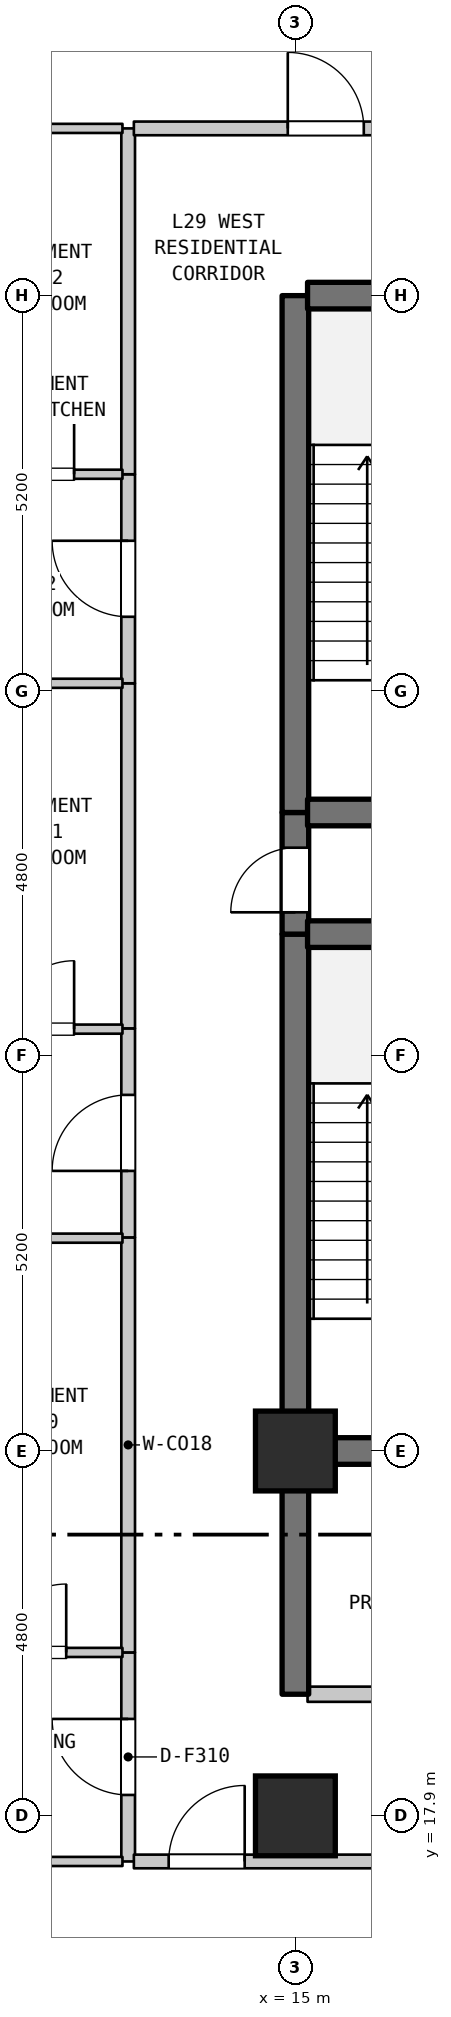
"""IFC4 building model, lengths in metres.
Left out: names, types, materials, properties, quantities, classifications, styles, units other than length and angle.
Written with IfcOpenShell. Run it as: python <this file> out.ifc"""

import sys

from ifc_helpers import new_model, si_unit, direction, frame, frame_2d, origin, origin_2d, place, context, subcontext, project, spatial, rectangle, extrude, element, fill, save


model = new_model("IFC4")
c1 = context("Model", 3, precision=1e-05, world=origin(), true_north=direction((0.0, 1.0)))
c2 = subcontext(c1, "Body", "Model", "MODEL_VIEW")
j1 = project(units=[si_unit("LENGTHUNIT", "METRE"), si_unit("PLANEANGLEUNIT", "RADIAN")], contexts=[c1])
p1 = place(None, origin())
s1 = spatial("IfcSite", under=j1, at=p1, CompositionType="ELEMENT")
p2 = place(p1, origin())
s2 = spatial("IfcBuilding", under=s1, at=p2, CompositionType="ELEMENT")
p3 = place(p2, frame((0.0, 0.0, 120.5)))
s3 = spatial("IfcBuildingStorey", under=s2, at=p3, CompositionType="ELEMENT", Elevation=120.5)
for number, where, z_axis, x_axis in (
    (1, (15.0, 17.9, 0.0), (0.0, 0.0, 1.0), (1.0, 0.0, 0.0)),
    (2, (15.0, 22.7, 0.0), (0.0, 0.0, 1.0), (1.0, 0.0, 0.0)),
):
    element("IfcColumn", number, at=place(p3, frame(where, z_axis=z_axis, x_axis=x_axis)), inside=s3, PredefinedType="COLUMN", context=c2, shape_type="SweptSolid", body=[
        extrude(rectangle(XDim=1.05, YDim=1.05, at=origin_2d()), origin(), (0.0, 0.0, 1.0), 4.8),
    ])
p4 = place(p3, frame((12.8, 17.3, 0.0), z_axis=(0.0, 0.0, 1.0), x_axis=(0.0, 1.0, 0.0)))
e3 = element("IfcWall", 3, at=p4, inside=s3, PredefinedType="STANDARD", context=c2, shape_type="SweptSolid", body=[
    extrude(rectangle(XDim=2.75, YDim=0.18, at=frame_2d((1.375, 0.0))), origin(), (0.0, 0.0, 1.0), 4.48),
])
p5 = place(p4, frame((0.875, 0.0, 0.0)))
e4 = element("IfcOpeningElement", 4, at=p5, cuts=e3, PredefinedType="OPENING", context=c2, shape_type="SweptSolid", body=[
    extrude(rectangle(XDim=1.0, YDim=2.15, at=frame_2d((0.5, 1.075))), frame((0.0, 0.1, 0.0), z_axis=(0.0, -1.0, 0.0), x_axis=(1.0, 0.0, 0.0)), (0.0, 0.0, 1.0), 0.2),
])
p6 = place(p3, frame((12.8, 20.05, 0.0), z_axis=(0.0, 0.0, 1.0), x_axis=(0.0, 1.0, 0.0)))
e5 = element("IfcWall", 5, at=p6, inside=s3, PredefinedType="STANDARD", context=c2, shape_type="SweptSolid", body=[
    extrude(rectangle(XDim=5.46, YDim=0.18, at=frame_2d((2.73, 0.0))), origin(), (0.0, 0.0, 1.0), 4.48),
])
p7 = place(p3, frame((12.8, 25.51, 0.0), z_axis=(0.0, 0.0, 1.0), x_axis=(0.0, 1.0, 0.0)))
e6 = element("IfcWall", 6, at=p7, inside=s3, PredefinedType="STANDARD", context=c2, shape_type="SweptSolid", body=[
    extrude(rectangle(XDim=2.75, YDim=0.18, at=frame_2d((1.375, 0.0))), origin(), (0.0, 0.0, 1.0), 4.48),
])
p8 = place(p7, frame((0.875, 0.0, 0.0)))
e7 = element("IfcOpeningElement", 7, at=p8, cuts=e6, PredefinedType="OPENING", context=c2, shape_type="SweptSolid", body=[
    extrude(rectangle(XDim=1.0, YDim=2.15, at=frame_2d((0.5, 1.075))), frame((0.0, 0.1, 0.0), z_axis=(0.0, -1.0, 0.0), x_axis=(1.0, 0.0, 0.0)), (0.0, 0.0, 1.0), 0.2),
])
p9 = place(p3, frame((12.8, 28.26, 0.0), z_axis=(0.0, 0.0, 1.0), x_axis=(0.0, 1.0, 0.0)))
e8 = element("IfcWall", 8, at=p9, inside=s3, PredefinedType="STANDARD", context=c2, shape_type="SweptSolid", body=[
    extrude(rectangle(XDim=4.54, YDim=0.18, at=frame_2d((2.27, 0.0))), origin(), (0.0, 0.0, 1.0), 4.48),
])
p10 = place(p3, frame((12.8, 32.8, 0.0), z_axis=(0.0, 0.0, 1.0), x_axis=(0.0, 1.0, 0.0)))
e9 = element("IfcWall", 9, at=p10, inside=s3, PredefinedType="STANDARD", context=c2, shape_type="SweptSolid", body=[
    extrude(rectangle(XDim=2.75, YDim=0.18, at=frame_2d((1.375, 0.0))), origin(), (0.0, 0.0, 1.0), 4.48),
])
p11 = place(p10, frame((0.875, 0.0, 0.0)))
e10 = element("IfcOpeningElement", 10, at=p11, cuts=e9, PredefinedType="OPENING", context=c2, shape_type="SweptSolid", body=[
    extrude(rectangle(XDim=1.0, YDim=2.15, at=frame_2d((0.5, 1.075))), frame((0.0, 0.1, 0.0), z_axis=(0.0, -1.0, 0.0), x_axis=(1.0, 0.0, 0.0)), (0.0, 0.0, 1.0), 0.2),
])
p12 = place(p3, frame((12.8, 35.55, 0.0), z_axis=(0.0, 0.0, 1.0), x_axis=(0.0, 1.0, 0.0)))
e11 = element("IfcWall", 11, at=p12, inside=s3, PredefinedType="STANDARD", context=c2, shape_type="SweptSolid", body=[
    extrude(rectangle(XDim=4.55, YDim=0.18, at=frame_2d((2.275, 0.0))), origin(), (0.0, 0.0, 1.0), 4.48),
])
p13 = place(p3, frame((15.0, 19.5, 0.0), z_axis=(0.0, 0.0, 1.0), x_axis=(0.0, 1.0, 0.0)))
e12 = element("IfcWall", 12, at=p13, inside=s3, PredefinedType="SHEAR", context=c2, shape_type="SweptSolid", body=[
    extrude(rectangle(XDim=3.2, YDim=0.35, at=frame_2d((1.6, 0.0))), origin(), (0.0, 0.0, 1.0), 4.48),
])
p14 = place(p3, frame((15.0, 22.7, 0.0), z_axis=(0.0, 0.0, 1.0), x_axis=(0.0, 1.0, 0.0)))
e13 = element("IfcWall", 13, at=p14, inside=s3, PredefinedType="SHEAR", context=c2, shape_type="SweptSolid", body=[
    extrude(rectangle(XDim=6.8, YDim=0.35, at=frame_2d((3.4, 0.0))), origin(), (0.0, 0.0, 1.0), 4.48),
])
p15 = place(p3, frame((15.0, 29.5, 0.0), z_axis=(0.0, 0.0, 1.0), x_axis=(0.0, 1.0, 0.0)))
e14 = element("IfcWall", 14, at=p15, inside=s3, PredefinedType="SHEAR", context=c2, shape_type="SweptSolid", body=[
    extrude(rectangle(XDim=1.6, YDim=0.35, at=frame_2d((0.8, 0.0))), origin(), (0.0, 0.0, 1.0), 4.48),
])
p16 = place(p15, frame((0.287, 0.0, 0.0)))
e15 = element("IfcOpeningElement", 15, at=p16, cuts=e14, PredefinedType="OPENING", context=c2, shape_type="SweptSolid", body=[
    extrude(rectangle(XDim=0.85, YDim=2.1, at=frame_2d((0.425, 1.05))), frame((0.0, 0.185, 0.0), z_axis=(0.0, -1.0, 0.0), x_axis=(1.0, 0.0, 0.0)), (0.0, 0.0, 1.0), 0.37),
])
p17 = place(p3, frame((15.0, 31.1, 0.0), z_axis=(0.0, 0.0, 1.0), x_axis=(0.0, 1.0, 0.0)))
e16 = element("IfcWall", 16, at=p17, inside=s3, PredefinedType="SHEAR", context=c2, shape_type="SweptSolid", body=[
    extrude(rectangle(XDim=6.8, YDim=0.35, at=frame_2d((3.4, 0.0))), origin(), (0.0, 0.0, 1.0), 4.48),
])
p18 = place(p3, frame((9.085, 17.3, 0.0), z_axis=(0.0, 0.0, 1.0), x_axis=(1.0, 0.0, 0.0)))
e17 = element("IfcWall", 17, at=p18, inside=s3, PredefinedType="PARTITIONING", context=c2, shape_type="SweptSolid", body=[
    extrude(rectangle(XDim=3.64, YDim=0.12, at=frame_2d((1.82, 0.0))), origin(), (0.0, 0.0, 1.0), 4.48),
])
p19 = place(p3, frame((12.875, 17.3, 0.0), z_axis=(0.0, 0.0, 1.0), x_axis=(1.0, 0.0, 0.0)))
e18 = element("IfcWall", 18, at=p19, inside=s3, PredefinedType="STANDARD", context=c2, shape_type="SweptSolid", body=[
    extrude(rectangle(XDim=3.78, YDim=0.18, at=frame_2d((1.89, 0.0))), origin(), (0.0, 0.0, 1.0), 4.48),
])
p20 = place(p19, frame((0.458, 0.0, 0.0)))
e19 = element("IfcOpeningElement", 19, at=p20, cuts=e18, PredefinedType="OPENING", context=c2, shape_type="SweptSolid", body=[
    extrude(rectangle(XDim=1.0, YDim=2.15, at=frame_2d((0.5, 1.075))), frame((0.0, 0.1, 0.0), z_axis=(0.0, -1.0, 0.0), x_axis=(1.0, 0.0, 0.0)), (0.0, 0.0, 1.0), 0.2),
])
p21 = place(p3, frame((15.16, 19.5, 0.0), z_axis=(0.0, 0.0, 1.0), x_axis=(1.0, 0.0, 0.0)))
e20 = element("IfcWall", 20, at=p21, inside=s3, PredefinedType="STANDARD", context=c2, shape_type="SweptSolid", body=[
    extrude(rectangle(XDim=3.68, YDim=0.2, at=frame_2d((1.84, 0.0))), origin(), (0.0, 0.0, 1.0), 4.48),
])
p22 = place(p21, frame((1.39, 0.0, 0.0)))
e21 = element("IfcOpeningElement", 21, at=p22, cuts=e20, PredefinedType="OPENING", context=c2, shape_type="SweptSolid", body=[
    extrude(rectangle(XDim=0.9, YDim=2.15, at=frame_2d((0.45, 1.075))), frame((0.0, 0.11, 0.0), z_axis=(0.0, -1.0, 0.0), x_axis=(1.0, 0.0, 0.0)), (0.0, 0.0, 1.0), 0.22),
])
p23 = place(p3, frame((10.456, 20.05, 0.0), z_axis=(0.0, 0.0, 1.0), x_axis=(1.0, 0.0, 0.0)))
e22 = element("IfcWall", 22, at=p23, inside=s3, PredefinedType="PARTITIONING", context=c2, shape_type="SweptSolid", body=[
    extrude(rectangle(XDim=2.269, YDim=0.12, at=frame_2d((1.135, 0.0))), origin(), (0.0, 0.0, 1.0), 4.48),
])
p24 = place(p23, frame((0.629, 0.0, 0.0)))
e23 = element("IfcOpeningElement", 23, at=p24, cuts=e22, PredefinedType="OPENING", context=c2, shape_type="SweptSolid", body=[
    extrude(rectangle(XDim=0.9, YDim=2.1, at=frame_2d((0.45, 1.05))), frame((0.0, 0.07, 0.0), z_axis=(0.0, -1.0, 0.0), x_axis=(1.0, 0.0, 0.0)), (0.0, 0.0, 1.0), 0.14),
])
p25 = place(p3, frame((15.16, 22.7, 0.0), z_axis=(0.0, 0.0, 1.0), x_axis=(1.0, 0.0, 0.0)))
e24 = element("IfcWall", 24, at=p25, inside=s3, PredefinedType="SHEAR", context=c2, shape_type="SweptSolid", body=[
    extrude(rectangle(XDim=3.68, YDim=0.35, at=frame_2d((1.84, 0.0))), origin(), (0.0, 0.0, 1.0), 4.48),
])
p26 = place(p3, frame((10.456, 25.5, 0.0), z_axis=(0.0, 0.0, 1.0), x_axis=(1.0, 0.0, 0.0)))
e25 = element("IfcWall", 25, at=p26, inside=s3, PredefinedType="PARTITIONING", context=c2, shape_type="SweptSolid", body=[
    extrude(rectangle(XDim=2.269, YDim=0.12, at=frame_2d((1.135, 0.0))), origin(), (0.0, 0.0, 1.0), 4.48),
])
p27 = place(p3, frame((10.523, 28.25, 0.0), z_axis=(0.0, 0.0, 1.0), x_axis=(1.0, 0.0, 0.0)))
e26 = element("IfcWall", 26, at=p27, inside=s3, PredefinedType="PARTITIONING", context=c2, shape_type="SweptSolid", body=[
    extrude(rectangle(XDim=2.202, YDim=0.12, at=frame_2d((1.101, 0.0))), origin(), (0.0, 0.0, 1.0), 4.48),
])
p28 = place(p27, frame((0.666, 0.0, 0.0)))
e27 = element("IfcOpeningElement", 27, at=p28, cuts=e26, PredefinedType="OPENING", context=c2, shape_type="SweptSolid", body=[
    extrude(rectangle(XDim=0.9, YDim=2.1, at=frame_2d((0.45, 1.05))), frame((0.0, 0.07, 0.0), z_axis=(0.0, -1.0, 0.0), x_axis=(1.0, 0.0, 0.0)), (0.0, 0.0, 1.0), 0.14),
])
for number, where, z_axis, x_axis in (
    (28, (15.16, 29.5, 0.0), (0.0, 0.0, 1.0), (1.0, 0.0, 0.0)),
    (29, (15.16, 31.1, 0.0), (0.0, 0.0, 1.0), (1.0, 0.0, 0.0)),
):
    element("IfcWall", number, at=place(p3, frame(where, z_axis=z_axis, x_axis=x_axis)), inside=s3, PredefinedType="SHEAR", context=c2, shape_type="SweptSolid", body=[
        extrude(rectangle(XDim=3.68, YDim=0.35, at=frame_2d((1.84, 0.0))), origin(), (0.0, 0.0, 1.0), 4.48),
    ])
p29 = place(p3, frame((10.523, 32.8, 0.0), z_axis=(0.0, 0.0, 1.0), x_axis=(1.0, 0.0, 0.0)))
e30 = element("IfcWall", 30, at=p29, inside=s3, PredefinedType="PARTITIONING", context=c2, shape_type="SweptSolid", body=[
    extrude(rectangle(XDim=2.202, YDim=0.12, at=frame_2d((1.101, 0.0))), origin(), (0.0, 0.0, 1.0), 4.48),
])
p30 = place(p3, frame((10.523, 35.55, 0.0), z_axis=(0.0, 0.0, 1.0), x_axis=(1.0, 0.0, 0.0)))
e31 = element("IfcWall", 31, at=p30, inside=s3, PredefinedType="PARTITIONING", context=c2, shape_type="SweptSolid", body=[
    extrude(rectangle(XDim=2.202, YDim=0.12, at=frame_2d((1.101, 0.0))), origin(), (0.0, 0.0, 1.0), 4.48),
])
p31 = place(p30, frame((0.666, 0.0, 0.0)))
e32 = element("IfcOpeningElement", 32, at=p31, cuts=e31, PredefinedType="OPENING", context=c2, shape_type="SweptSolid", body=[
    extrude(rectangle(XDim=0.9, YDim=2.1, at=frame_2d((0.45, 1.05))), frame((0.0, 0.07, 0.0), z_axis=(0.0, -1.0, 0.0), x_axis=(1.0, 0.0, 0.0)), (0.0, 0.0, 1.0), 0.14),
])
p32 = place(p3, frame((15.16, 37.9, 0.0), z_axis=(0.0, 0.0, 1.0), x_axis=(1.0, 0.0, 0.0)))
e33 = element("IfcWall", 33, at=p32, inside=s3, PredefinedType="SHEAR", context=c2, shape_type="SweptSolid", body=[
    extrude(rectangle(XDim=3.68, YDim=0.35, at=frame_2d((1.84, 0.0))), origin(), (0.0, 0.0, 1.0), 4.48),
])
p33 = place(p3, frame((10.523, 40.1, 0.0), z_axis=(0.0, 0.0, 1.0), x_axis=(1.0, 0.0, 0.0)))
e34 = element("IfcWall", 34, at=p33, inside=s3, PredefinedType="PARTITIONING", context=c2, shape_type="SweptSolid", body=[
    extrude(rectangle(XDim=2.202, YDim=0.12, at=frame_2d((1.101, 0.0))), origin(), (0.0, 0.0, 1.0), 4.48),
])
p34 = place(p3, frame((12.875, 40.1, 0.0), z_axis=(0.0, 0.0, 1.0), x_axis=(1.0, 0.0, 0.0)))
e35 = element("IfcWall", 35, at=p34, inside=s3, PredefinedType="STANDARD", context=c2, shape_type="SweptSolid", body=[
    extrude(rectangle(XDim=5.08, YDim=0.18, at=frame_2d((2.54, 0.0))), origin(), (0.0, 0.0, 1.0), 4.48),
])
p35 = place(p34, frame((2.025, 0.0, 0.0)))
e36 = element("IfcOpeningElement", 36, at=p35, cuts=e35, PredefinedType="OPENING", context=c2, shape_type="SweptSolid", body=[
    extrude(rectangle(XDim=1.0, YDim=2.15, at=frame_2d((0.5, 1.075))), frame((0.0, 0.1, 0.0), z_axis=(0.0, -1.0, 0.0), x_axis=(1.0, 0.0, 0.0)), (0.0, 0.0, 1.0), 0.2),
])
p36 = place(p5, origin())
e37 = element("IfcDoor", 37, at=p36, inside=s3, OperationType="SINGLE_SWING_RIGHT", PredefinedType="DOOR", context=c2, shape_type="SweptSolid", body=[
    extrude(rectangle(XDim=1.0, YDim=2.15, at=frame_2d((0.5, 1.075))), frame((0.0, 0.025, 0.0), z_axis=(0.0, -1.0, 0.0), x_axis=(1.0, 0.0, 0.0)), (0.0, 0.0, 1.0), 0.05),
])
fill(e4, e37)
p37 = place(p8, origin())
e38 = element("IfcDoor", 38, at=p37, inside=s3, OperationType="SINGLE_SWING_LEFT", PredefinedType="DOOR", context=c2, shape_type="SweptSolid", body=[
    extrude(rectangle(XDim=1.0, YDim=2.15, at=frame_2d((0.5, 1.075))), frame((0.0, 0.025, 0.0), z_axis=(0.0, -1.0, 0.0), x_axis=(1.0, 0.0, 0.0)), (0.0, 0.0, 1.0), 0.05),
])
fill(e7, e38)
p38 = place(p11, origin())
e39 = element("IfcDoor", 39, at=p38, inside=s3, OperationType="SINGLE_SWING_RIGHT", PredefinedType="DOOR", context=c2, shape_type="SweptSolid", body=[
    extrude(rectangle(XDim=1.0, YDim=2.15, at=frame_2d((0.5, 1.075))), frame((0.0, 0.025, 0.0), z_axis=(0.0, -1.0, 0.0), x_axis=(1.0, 0.0, 0.0)), (0.0, 0.0, 1.0), 0.05),
])
fill(e10, e39)
p39 = place(p16, origin())
e40 = element("IfcDoor", 40, at=p39, inside=s3, OperationType="SINGLE_SWING_LEFT", PredefinedType="DOOR", context=c2, shape_type="SweptSolid", body=[
    extrude(rectangle(XDim=0.85, YDim=2.1, at=frame_2d((0.425, 1.05))), frame((0.0, 0.025, 0.0), z_axis=(0.0, -1.0, 0.0), x_axis=(1.0, 0.0, 0.0)), (0.0, 0.0, 1.0), 0.05),
])
fill(e15, e40)
p40 = place(p20, origin())
e41 = element("IfcDoor", 41, at=p40, inside=s3, OperationType="SINGLE_SWING_RIGHT", PredefinedType="DOOR", context=c2, shape_type="SweptSolid", body=[
    extrude(rectangle(XDim=1.0, YDim=2.15, at=frame_2d((0.5, 1.075))), frame((0.0, 0.025, 0.0), z_axis=(0.0, -1.0, 0.0), x_axis=(1.0, 0.0, 0.0)), (0.0, 0.0, 1.0), 0.05),
])
fill(e19, e41)
p41 = place(p24, origin())
e42 = element("IfcDoor", 42, at=p41, inside=s3, OperationType="SINGLE_SWING_RIGHT", PredefinedType="DOOR", context=c2, shape_type="SweptSolid", body=[
    extrude(rectangle(XDim=0.9, YDim=2.1, at=frame_2d((0.45, 1.05))), frame((0.0, 0.025, 0.0), z_axis=(0.0, -1.0, 0.0), x_axis=(1.0, 0.0, 0.0)), (0.0, 0.0, 1.0), 0.05),
])
fill(e23, e42)
p42 = place(p28, origin())
e43 = element("IfcDoor", 43, at=p42, inside=s3, OperationType="SINGLE_SWING_RIGHT", PredefinedType="DOOR", context=c2, shape_type="SweptSolid", body=[
    extrude(rectangle(XDim=0.9, YDim=2.1, at=frame_2d((0.45, 1.05))), frame((0.0, 0.025, 0.0), z_axis=(0.0, -1.0, 0.0), x_axis=(1.0, 0.0, 0.0)), (0.0, 0.0, 1.0), 0.05),
])
fill(e27, e43)
p43 = place(p31, origin())
e44 = element("IfcDoor", 44, at=p43, inside=s3, OperationType="SINGLE_SWING_RIGHT", PredefinedType="DOOR", context=c2, shape_type="SweptSolid", body=[
    extrude(rectangle(XDim=0.9, YDim=2.1, at=frame_2d((0.45, 1.05))), frame((0.0, 0.025, 0.0), z_axis=(0.0, -1.0, 0.0), x_axis=(1.0, 0.0, 0.0)), (0.0, 0.0, 1.0), 0.05),
])
fill(e32, e44)
p44 = place(p35, origin())
e45 = element("IfcDoor", 45, at=p44, inside=s3, OperationType="SINGLE_SWING_LEFT", PredefinedType="DOOR", context=c2, shape_type="SweptSolid", body=[
    extrude(rectangle(XDim=1.0, YDim=2.15, at=frame_2d((0.5, 1.075))), frame((0.0, 0.025, 0.0), z_axis=(0.0, -1.0, 0.0), x_axis=(1.0, 0.0, 0.0)), (0.0, 0.0, 1.0), 0.05),
])
fill(e36, e45)
save(model, sys.argv[1])
